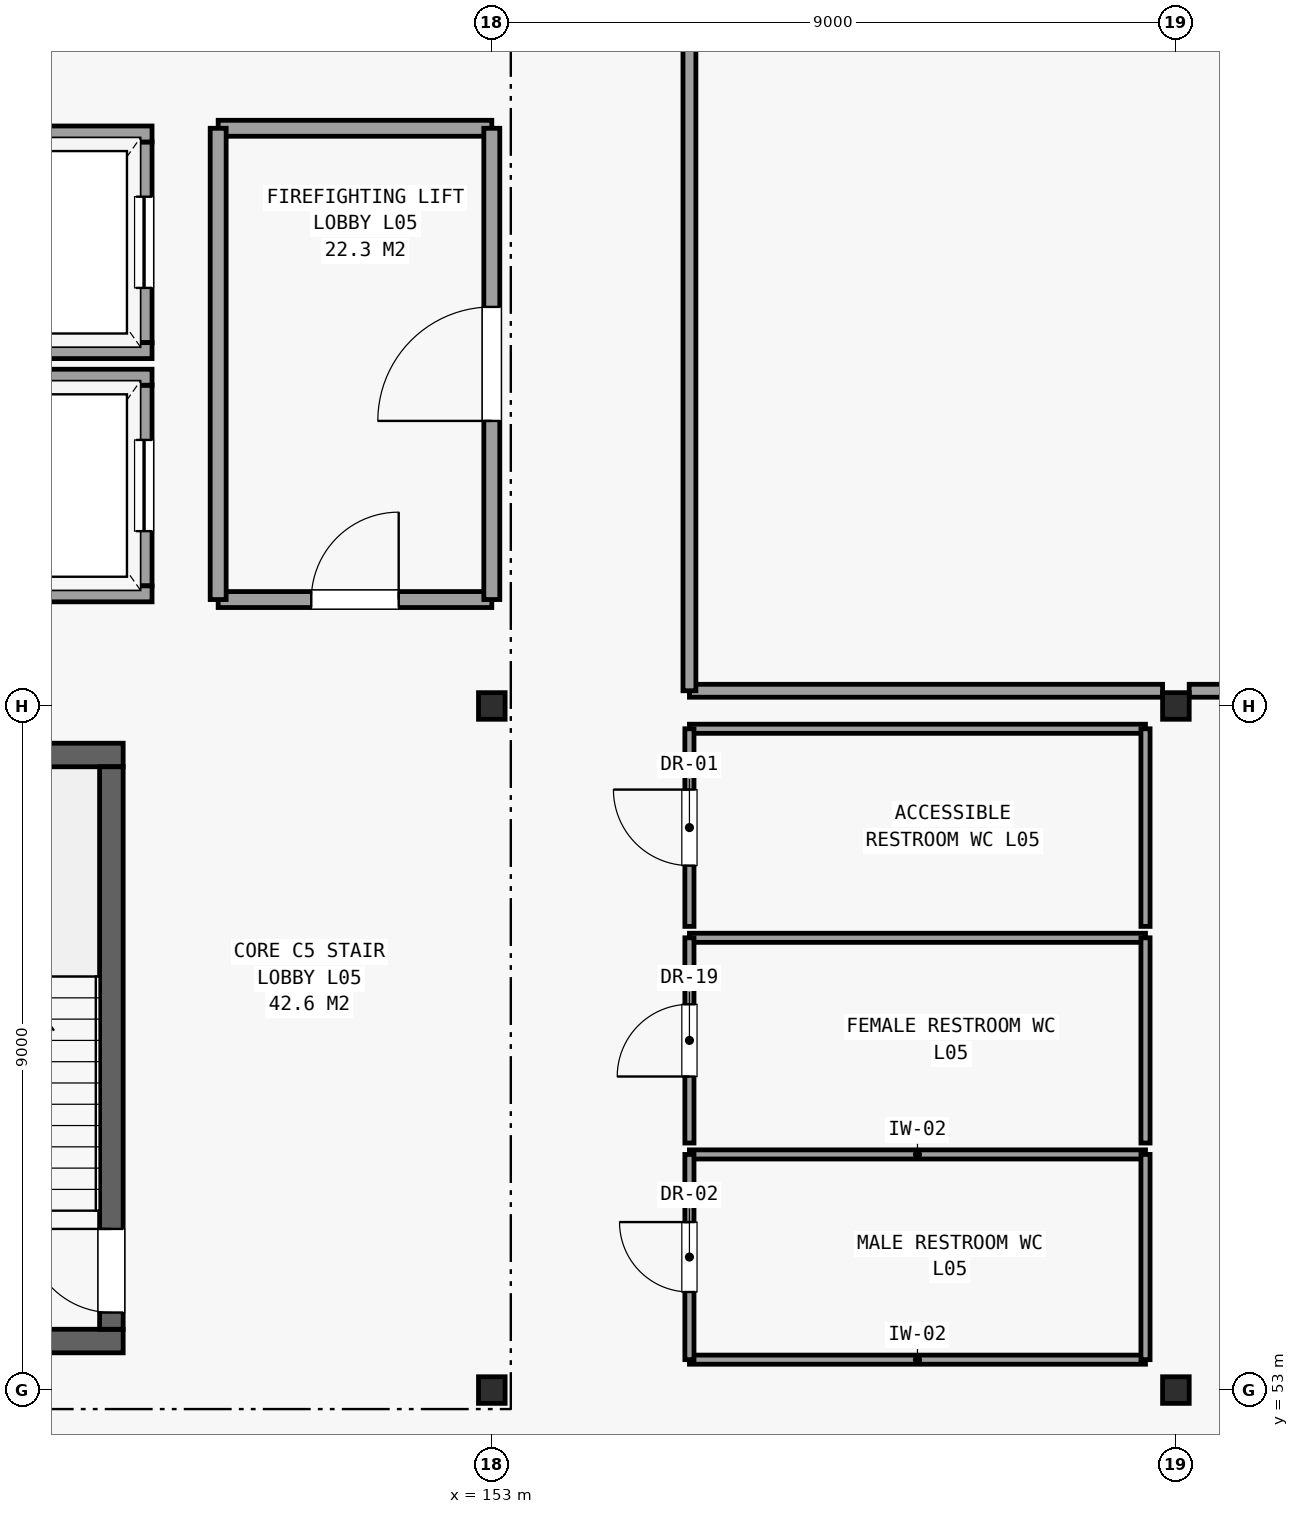
"""IFC4 building model, lengths in metres.
Left out: names, types, materials, properties, quantities, classifications, styles, units other than length and angle.
Written with IfcOpenShell. Run it as: python <this file> out.ifc"""

import sys

from ifc_helpers import new_model, si_unit, direction, frame, frame_2d, origin, origin_2d, place, context, subcontext, project, spatial, rectangle, hollow_rectangle, extrude, element, fill, save


model = new_model("IFC4")
c1 = context("Model", 3, precision=1e-05, world=origin(), true_north=direction((0.0, 1.0)))
c2 = subcontext(c1, "Body", "Model", "MODEL_VIEW")
j1 = project(units=[si_unit("LENGTHUNIT", "METRE"), si_unit("PLANEANGLEUNIT", "RADIAN")], contexts=[c1])
p1 = place(None, origin())
s1 = spatial("IfcSite", under=j1, at=p1, CompositionType="ELEMENT")
p2 = place(p1, origin())
s2 = spatial("IfcBuilding", under=s1, at=p2, CompositionType="ELEMENT")
p3 = place(p2, frame((0.0, 0.0, 21.9)))
s3 = spatial("IfcBuildingStorey", under=s2, at=p3, CompositionType="ELEMENT", Elevation=21.9)
for number, where, z_axis, x_axis in (
    (1, (153.0, 53.0, 0.0), (0.0, 0.0, 1.0), (1.0, 0.0, 0.0)),
    (2, (153.0, 62.0, 0.0), (0.0, 0.0, 1.0), (1.0, 0.0, 0.0)),
    (3, (162.0, 53.0, 0.0), (0.0, 0.0, 1.0), (1.0, 0.0, 0.0)),
    (4, (162.0, 62.0, 0.0), (0.0, 0.0, 1.0), (1.0, 0.0, 0.0)),
):
    element("IfcColumn", number, at=place(p3, frame(where, z_axis=z_axis, x_axis=x_axis)), inside=s3, PredefinedType="COLUMN", context=c2, shape_type="SweptSolid", body=[
        extrude(hollow_rectangle(XDim=0.35, YDim=0.35, WallThickness=0.016, at=origin_2d()), origin(), (0.0, 0.0, 1.0), 4.2),
    ])
for number, where, z_axis, x_axis in (
    (5, (144.25, 53.645, 0.0), (0.0, 0.0, 1.0), (1.0, 0.0, 0.0)),
    (6, (144.25, 61.355, 0.0), (0.0, 0.0, 1.0), (1.0, 0.0, 0.0)),
):
    element("IfcWall", number, at=place(p3, frame(where, z_axis=z_axis, x_axis=x_axis)), inside=s3, PredefinedType="SHEAR", context=c2, shape_type="SweptSolid", body=[
        extrude(rectangle(XDim=3.9, YDim=0.31, at=frame_2d((1.95, 0.0))), origin(), (0.0, 0.0, 1.0), 3.94),
    ])
p4 = place(p3, frame((147.995, 53.8, 0.0), z_axis=(0.0, 0.0, 1.0), x_axis=(0.0, 1.0, 0.0)))
e7 = element("IfcWall", 7, at=p4, inside=s3, PredefinedType="SHEAR", context=c2, shape_type="SweptSolid", body=[
    extrude(rectangle(XDim=7.4, YDim=0.31, at=frame_2d((3.7, 0.0))), origin(), (0.0, 0.0, 1.0), 3.94),
])
p5 = place(p4, frame((0.22, 0.0, 0.0)))
e8 = element("IfcOpeningElement", 8, at=p5, cuts=e7, PredefinedType="OPENING", context=c2, shape_type="SweptSolid", body=[
    extrude(rectangle(XDim=1.1, YDim=2.15, at=frame_2d((0.55, 1.075))), frame((0.0, 0.166, 0.0), z_axis=(0.0, -1.0, 0.0), x_axis=(1.0, 0.0, 0.0)), (0.0, 0.0, 1.0), 0.332),
])
p6 = place(p3, frame((148.425, 63.58, 0.0), z_axis=(0.0, 0.0, 1.0), x_axis=(0.0, 1.0, 0.0)))
e9 = element("IfcWall", 9, at=p6, inside=s3, PredefinedType="PARTITIONING", context=c2, shape_type="SweptSolid", body=[
    extrude(rectangle(XDim=2.64, YDim=0.21, at=frame_2d((1.32, 0.0))), origin(), (0.0, 0.0, 1.0), 3.94),
])
p7 = place(p6, frame((0.72, 0.0, 0.0)))
e10 = element("IfcOpeningElement", 10, at=p7, cuts=e9, PredefinedType="OPENING", context=c2, shape_type="SweptSolid", body=[
    extrude(rectangle(XDim=1.2, YDim=2.2, at=frame_2d((0.6, 1.1))), frame((0.0, 0.116, 0.0), z_axis=(0.0, -1.0, 0.0), x_axis=(1.0, 0.0, 0.0)), (0.0, 0.0, 1.0), 0.232),
])
for number, where, z_axis, x_axis in (
    (11, (146.27, 63.475, 0.0), (0.0, 0.0, 1.0), (1.0, 0.0, 0.0)),
    (12, (146.27, 66.325, 0.0), (0.0, 0.0, 1.0), (1.0, 0.0, 0.0)),
):
    element("IfcWall", number, at=place(p3, frame(where, z_axis=z_axis, x_axis=x_axis)), inside=s3, PredefinedType="PARTITIONING", context=c2, shape_type="SweptSolid", body=[
        extrude(rectangle(XDim=2.26, YDim=0.21, at=frame_2d((1.13, 0.0))), origin(), (0.0, 0.0, 1.0), 3.94),
    ])
p8 = place(p3, frame((148.425, 66.78, 0.0), z_axis=(0.0, 0.0, 1.0), x_axis=(0.0, 1.0, 0.0)))
e13 = element("IfcWall", 13, at=p8, inside=s3, PredefinedType="PARTITIONING", context=c2, shape_type="SweptSolid", body=[
    extrude(rectangle(XDim=2.64, YDim=0.21, at=frame_2d((1.32, 0.0))), origin(), (0.0, 0.0, 1.0), 3.94),
])
p9 = place(p8, frame((0.72, 0.0, 0.0)))
e14 = element("IfcOpeningElement", 14, at=p9, cuts=e13, PredefinedType="OPENING", context=c2, shape_type="SweptSolid", body=[
    extrude(rectangle(XDim=1.2, YDim=2.2, at=frame_2d((0.6, 1.1))), frame((0.0, 0.116, 0.0), z_axis=(0.0, -1.0, 0.0), x_axis=(1.0, 0.0, 0.0)), (0.0, 0.0, 1.0), 0.232),
])
for number, where, z_axis, x_axis in (
    (15, (146.27, 66.675, 0.0), (0.0, 0.0, 1.0), (1.0, 0.0, 0.0)),
    (16, (146.27, 69.525, 0.0), (0.0, 0.0, 1.0), (1.0, 0.0, 0.0)),
):
    element("IfcWall", number, at=place(p3, frame(where, z_axis=z_axis, x_axis=x_axis)), inside=s3, PredefinedType="PARTITIONING", context=c2, shape_type="SweptSolid", body=[
        extrude(rectangle(XDim=2.26, YDim=0.21, at=frame_2d((1.13, 0.0))), origin(), (0.0, 0.0, 1.0), 3.94),
    ])
p10 = place(p3, frame((149.4, 63.4, 0.0), z_axis=(0.0, 0.0, 1.0), x_axis=(1.0, 0.0, 0.0)))
e17 = element("IfcWall", 17, at=p10, inside=s3, PredefinedType="PARTITIONING", context=c2, shape_type="SweptSolid", body=[
    extrude(rectangle(XDim=3.6, YDim=0.21, at=frame_2d((1.8, 0.0))), origin(), (0.0, 0.0, 1.0), 3.29),
])
p11 = place(p10, frame((1.225, 0.0, 0.0)))
e18 = element("IfcOpeningElement", 18, at=p11, cuts=e17, PredefinedType="OPENING", context=c2, shape_type="SweptSolid", body=[
    extrude(rectangle(XDim=1.15, YDim=2.2, at=frame_2d((0.575, 1.1))), frame((0.0, 0.116, 0.0), z_axis=(0.0, -1.0, 0.0), x_axis=(1.0, 0.0, 0.0)), (0.0, 0.0, 1.0), 0.232),
])
p12 = place(p3, frame((149.4, 69.6, 0.0), z_axis=(0.0, 0.0, 1.0), x_axis=(1.0, 0.0, 0.0)))
e19 = element("IfcWall", 19, at=p12, inside=s3, PredefinedType="PARTITIONING", context=c2, shape_type="SweptSolid", body=[
    extrude(rectangle(XDim=3.6, YDim=0.21, at=frame_2d((1.8, 0.0))), origin(), (0.0, 0.0, 1.0), 3.29),
])
p13 = place(p3, frame((149.4, 63.4, 0.0), z_axis=(0.0, 0.0, 1.0), x_axis=(0.0, 1.0, 0.0)))
e20 = element("IfcWall", 20, at=p13, inside=s3, PredefinedType="PARTITIONING", context=c2, shape_type="SweptSolid", body=[
    extrude(rectangle(XDim=6.2, YDim=0.21, at=frame_2d((3.1, 0.0))), origin(), (0.0, 0.0, 1.0), 3.94),
])
p14 = place(p3, frame((153.0, 63.4, 0.0), z_axis=(0.0, 0.0, 1.0), x_axis=(0.0, 1.0, 0.0)))
e21 = element("IfcWall", 21, at=p14, inside=s3, PredefinedType="PARTITIONING", context=c2, shape_type="SweptSolid", body=[
    extrude(rectangle(XDim=6.2, YDim=0.21, at=frame_2d((3.1, 0.0))), origin(), (0.0, 0.0, 1.0), 3.29),
])
p15 = place(p14, frame((2.35, 0.0, 0.0)))
e22 = element("IfcOpeningElement", 22, at=p15, cuts=e21, PredefinedType="OPENING", context=c2, shape_type="SweptSolid", body=[
    extrude(rectangle(XDim=1.5, YDim=2.25, at=frame_2d((0.75, 1.125))), frame((0.0, 0.116, 0.0), z_axis=(0.0, -1.0, 0.0), x_axis=(1.0, 0.0, 0.0)), (0.0, 0.0, 1.0), 0.232),
])
for number, where, z_axis, x_axis in (
    (23, (155.6, 53.4, 0.0), (0.0, 0.0, 1.0), (1.0, 0.0, 0.0)),
    (24, (155.6, 56.1, 0.0), (0.0, 0.0, 1.0), (1.0, 0.0, 0.0)),
):
    element("IfcWall", number, at=place(p3, frame(where, z_axis=z_axis, x_axis=x_axis)), inside=s3, PredefinedType="PARTITIONING", context=c2, shape_type="SweptSolid", body=[
        extrude(rectangle(XDim=6.0, YDim=0.12, at=frame_2d((3.0, 0.0))), origin(), (0.0, 0.0, 1.0), 3.94),
    ])
p16 = place(p3, frame((155.6, 53.4, 0.0), z_axis=(0.0, 0.0, 1.0), x_axis=(0.0, 1.0, 0.0)))
e25 = element("IfcWall", 25, at=p16, inside=s3, PredefinedType="PARTITIONING", context=c2, shape_type="SweptSolid", body=[
    extrude(rectangle(XDim=2.7, YDim=0.12, at=frame_2d((1.35, 0.0))), origin(), (0.0, 0.0, 1.0), 3.94),
])
p17 = place(p16, frame((0.89, 0.0, 0.0)))
e26 = element("IfcOpeningElement", 26, at=p17, cuts=e25, PredefinedType="OPENING", context=c2, shape_type="SweptSolid", body=[
    extrude(rectangle(XDim=0.92, YDim=2.1, at=frame_2d((0.46, 1.05))), frame((0.0, 0.071, 0.0), z_axis=(0.0, -1.0, 0.0), x_axis=(1.0, 0.0, 0.0)), (0.0, 0.0, 1.0), 0.142),
])
p18 = place(p3, frame((161.6, 53.4, 0.0), z_axis=(0.0, 0.0, 1.0), x_axis=(0.0, 1.0, 0.0)))
e27 = element("IfcWall", 27, at=p18, inside=s3, PredefinedType="PARTITIONING", context=c2, shape_type="SweptSolid", body=[
    extrude(rectangle(XDim=2.7, YDim=0.12, at=frame_2d((1.35, 0.0))), origin(), (0.0, 0.0, 1.0), 3.94),
])
p19 = place(p3, frame((155.6, 58.95, 0.0), z_axis=(0.0, 0.0, 1.0), x_axis=(1.0, 0.0, 0.0)))
e28 = element("IfcWall", 28, at=p19, inside=s3, PredefinedType="PARTITIONING", context=c2, shape_type="SweptSolid", body=[
    extrude(rectangle(XDim=6.0, YDim=0.12, at=frame_2d((3.0, 0.0))), origin(), (0.0, 0.0, 1.0), 3.94),
])
p20 = place(p3, frame((155.6, 56.25, 0.0), z_axis=(0.0, 0.0, 1.0), x_axis=(0.0, 1.0, 0.0)))
e29 = element("IfcWall", 29, at=p20, inside=s3, PredefinedType="PARTITIONING", context=c2, shape_type="SweptSolid", body=[
    extrude(rectangle(XDim=2.7, YDim=0.12, at=frame_2d((1.35, 0.0))), origin(), (0.0, 0.0, 1.0), 3.44),
])
p21 = place(p20, frame((0.875, 0.0, 0.0)))
e30 = element("IfcOpeningElement", 30, at=p21, cuts=e29, PredefinedType="OPENING", context=c2, shape_type="SweptSolid", body=[
    extrude(rectangle(XDim=0.95, YDim=2.15, at=frame_2d((0.475, 1.075))), frame((0.0, 0.071, 0.0), z_axis=(0.0, -1.0, 0.0), x_axis=(1.0, 0.0, 0.0)), (0.0, 0.0, 1.0), 0.142),
])
p22 = place(p3, frame((161.6, 56.25, 0.0), z_axis=(0.0, 0.0, 1.0), x_axis=(0.0, 1.0, 0.0)))
e31 = element("IfcWall", 31, at=p22, inside=s3, PredefinedType="PARTITIONING", context=c2, shape_type="SweptSolid", body=[
    extrude(rectangle(XDim=2.7, YDim=0.12, at=frame_2d((1.35, 0.0))), origin(), (0.0, 0.0, 1.0), 3.44),
])
p23 = place(p3, frame((155.6, 61.7, 0.0), z_axis=(0.0, 0.0, 1.0), x_axis=(1.0, 0.0, 0.0)))
e32 = element("IfcWall", 32, at=p23, inside=s3, PredefinedType="PARTITIONING", context=c2, shape_type="SweptSolid", body=[
    extrude(rectangle(XDim=6.0, YDim=0.12, at=frame_2d((3.0, 0.0))), origin(), (0.0, 0.0, 1.0), 3.24),
])
p24 = place(p3, frame((155.6, 59.1, 0.0), z_axis=(0.0, 0.0, 1.0), x_axis=(0.0, 1.0, 0.0)))
e33 = element("IfcWall", 33, at=p24, inside=s3, PredefinedType="PARTITIONING", context=c2, shape_type="SweptSolid", body=[
    extrude(rectangle(XDim=2.6, YDim=0.12, at=frame_2d((1.3, 0.0))), origin(), (0.0, 0.0, 1.0), 3.24),
])
p25 = place(p24, frame((0.8, 0.0, 0.0)))
e34 = element("IfcOpeningElement", 34, at=p25, cuts=e33, PredefinedType="OPENING", context=c2, shape_type="SweptSolid", body=[
    extrude(rectangle(XDim=1.0, YDim=2.15, at=frame_2d((0.5, 1.075))), frame((0.0, 0.071, 0.0), z_axis=(0.0, -1.0, 0.0), x_axis=(1.0, 0.0, 0.0)), (0.0, 0.0, 1.0), 0.142),
])
p26 = place(p3, frame((161.6, 59.1, 0.0), z_axis=(0.0, 0.0, 1.0), x_axis=(0.0, 1.0, 0.0)))
e35 = element("IfcWall", 35, at=p26, inside=s3, PredefinedType="PARTITIONING", context=c2, shape_type="SweptSolid", body=[
    extrude(rectangle(XDim=2.6, YDim=0.12, at=frame_2d((1.3, 0.0))), origin(), (0.0, 0.0, 1.0), 3.24),
])
p27 = place(p3, frame((155.6, 62.2, 0.0), z_axis=(0.0, 0.0, 1.0), x_axis=(1.0, 0.0, 0.0)))
e36 = element("IfcWall", 36, at=p27, inside=s3, PredefinedType="PARTITIONING", context=c2, shape_type="SweptSolid", body=[
    extrude(rectangle(XDim=6.225, YDim=0.17, at=frame_2d((3.112, 0.0))), origin(), (0.0, 0.0, 1.0), 3.24),
])
p28 = place(p3, frame((162.175, 62.2, 0.0), z_axis=(0.0, 0.0, 1.0), x_axis=(1.0, 0.0, 0.0)))
e37 = element("IfcWall", 37, at=p28, inside=s3, PredefinedType="PARTITIONING", context=c2, shape_type="SweptSolid", body=[
    extrude(rectangle(XDim=8.65, YDim=0.17, at=frame_2d((4.325, 0.0))), origin(), (0.0, 0.0, 1.0), 3.24),
])
p29 = place(p3, frame((155.6, 62.2, 0.0), z_axis=(0.0, 0.0, 1.0), x_axis=(0.0, 1.0, 0.0)))
e38 = element("IfcWall", 38, at=p29, inside=s3, PredefinedType="PARTITIONING", context=c2, shape_type="SweptSolid", body=[
    extrude(rectangle(XDim=17.6, YDim=0.17, at=frame_2d((8.8, 0.0))), origin(), (0.0, 0.0, 1.0), 3.24),
])
p30 = place(p29, frame((11.925, 0.0, 0.0)))
e39 = element("IfcOpeningElement", 39, at=p30, cuts=e38, PredefinedType="OPENING", context=c2, shape_type="SweptSolid", body=[
    extrude(rectangle(XDim=2.75, YDim=2.7, at=frame_2d((1.375, 1.35))), frame((0.0, 0.096, 0.0), z_axis=(0.0, -1.0, 0.0), x_axis=(1.0, 0.0, 0.0)), (0.0, 0.0, 1.0), 0.192),
])
p31 = place(p5, origin())
e40 = element("IfcDoor", 40, at=p31, inside=s3, OperationType="SINGLE_SWING_RIGHT", PredefinedType="DOOR", context=c2, shape_type="SweptSolid", body=[
    extrude(rectangle(XDim=1.1, YDim=2.15, at=frame_2d((0.55, 1.075))), frame((0.0, 0.025, 0.0), z_axis=(0.0, -1.0, 0.0), x_axis=(1.0, 0.0, 0.0)), (0.0, 0.0, 1.0), 0.05),
])
fill(e8, e40)
p32 = place(p7, origin())
e41 = element("IfcDoor", 41, at=p32, inside=s3, OperationType="SLIDING_TO_RIGHT", PredefinedType="DOOR", context=c2, shape_type="SweptSolid", body=[
    extrude(rectangle(XDim=1.2, YDim=2.2, at=frame_2d((0.6, 1.1))), frame((0.0, 0.025, 0.0), z_axis=(0.0, -1.0, 0.0), x_axis=(1.0, 0.0, 0.0)), (0.0, 0.0, 1.0), 0.05),
])
fill(e10, e41)
p33 = place(p9, origin())
e42 = element("IfcDoor", 42, at=p33, inside=s3, OperationType="SLIDING_TO_LEFT", PredefinedType="DOOR", context=c2, shape_type="SweptSolid", body=[
    extrude(rectangle(XDim=1.2, YDim=2.2, at=frame_2d((0.6, 1.1))), frame((0.0, 0.025, 0.0), z_axis=(0.0, -1.0, 0.0), x_axis=(1.0, 0.0, 0.0)), (0.0, 0.0, 1.0), 0.05),
])
fill(e14, e42)
p34 = place(p11, origin())
e43 = element("IfcDoor", 43, at=p34, inside=s3, OperationType="SINGLE_SWING_RIGHT", PredefinedType="DOOR", context=c2, shape_type="SweptSolid", body=[
    extrude(rectangle(XDim=1.15, YDim=2.2, at=frame_2d((0.575, 1.1))), frame((0.0, 0.025, 0.0), z_axis=(0.0, -1.0, 0.0), x_axis=(1.0, 0.0, 0.0)), (0.0, 0.0, 1.0), 0.05),
])
fill(e18, e43)
p35 = place(p15, origin())
e44 = element("IfcDoor", 44, at=p35, inside=s3, OperationType="SINGLE_SWING_LEFT", PredefinedType="DOOR", context=c2, shape_type="SweptSolid", body=[
    extrude(rectangle(XDim=1.5, YDim=2.25, at=frame_2d((0.75, 1.125))), frame((0.0, 0.025, 0.0), z_axis=(0.0, -1.0, 0.0), x_axis=(1.0, 0.0, 0.0)), (0.0, 0.0, 1.0), 0.05),
])
fill(e22, e44)
p36 = place(p17, origin())
e45 = element("IfcDoor", 45, at=p36, inside=s3, OperationType="SINGLE_SWING_RIGHT", PredefinedType="DOOR", context=c2, shape_type="SweptSolid", body=[
    extrude(rectangle(XDim=0.92, YDim=2.1, at=frame_2d((0.46, 1.05))), frame((0.0, 0.025, 0.0), z_axis=(0.0, -1.0, 0.0), x_axis=(1.0, 0.0, 0.0)), (0.0, 0.0, 1.0), 0.05),
])
fill(e26, e45)
p37 = place(p21, origin())
e46 = element("IfcDoor", 46, at=p37, inside=s3, OperationType="SINGLE_SWING_LEFT", PredefinedType="DOOR", context=c2, shape_type="SweptSolid", body=[
    extrude(rectangle(XDim=0.95, YDim=2.15, at=frame_2d((0.475, 1.075))), frame((0.0, 0.025, 0.0), z_axis=(0.0, -1.0, 0.0), x_axis=(1.0, 0.0, 0.0)), (0.0, 0.0, 1.0), 0.05),
])
fill(e30, e46)
p38 = place(p25, origin())
e47 = element("IfcDoor", 47, at=p38, inside=s3, OperationType="SINGLE_SWING_RIGHT", PredefinedType="DOOR", context=c2, shape_type="SweptSolid", body=[
    extrude(rectangle(XDim=1.0, YDim=2.15, at=frame_2d((0.5, 1.075))), frame((0.0, 0.025, 0.0), z_axis=(0.0, -1.0, 0.0), x_axis=(1.0, 0.0, 0.0)), (0.0, 0.0, 1.0), 0.05),
])
fill(e34, e47)
save(model, sys.argv[1])
